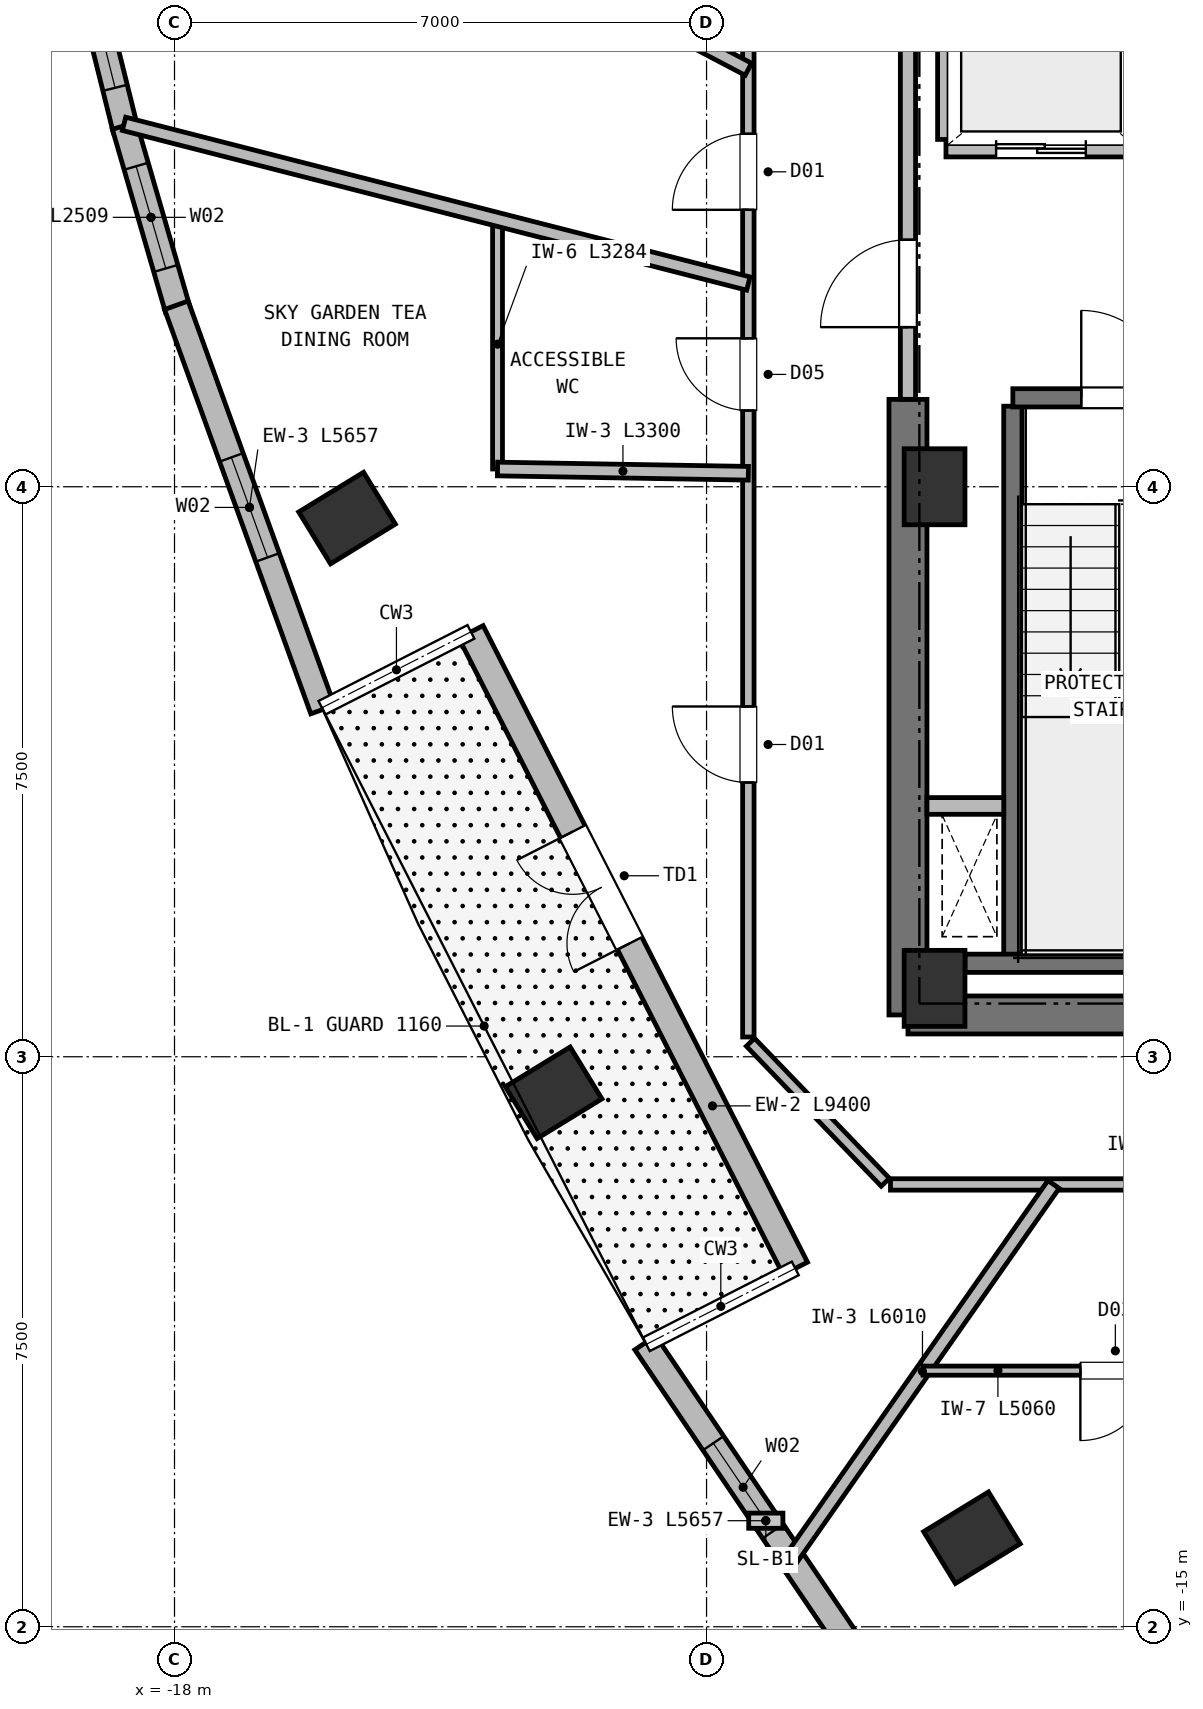
"""IFC4 building model, lengths in metres.
Left out: names, types, materials, properties, quantities, classifications, styles, units other than length and angle.
Written with IfcOpenShell. Run it as: python <this file> out.ifc"""

import sys

from ifc_helpers import new_model, si_unit, direction, frame, frame_2d, origin, origin_2d, place, context, subcontext, project, spatial, rectangle, extrude, element, fill, save


model = new_model("IFC4")
c1 = context("Model", 3, precision=1e-05, world=origin(), true_north=direction((0.0, 1.0)))
c2 = subcontext(c1, "Body", "Model", "MODEL_VIEW")
j1 = project(units=[si_unit("LENGTHUNIT", "METRE"), si_unit("PLANEANGLEUNIT", "RADIAN")], contexts=[c1])
p1 = place(None, origin())
s1 = spatial("IfcSite", under=j1, at=p1, CompositionType="ELEMENT")
p2 = place(p1, origin())
s2 = spatial("IfcBuilding", under=s1, at=p2, CompositionType="ELEMENT")
p3 = place(p2, frame((0.0, 0.0, 194.15)))
s3 = spatial("IfcBuildingStorey", under=s2, at=p3, CompositionType="ELEMENT", Elevation=194.15)
for number, where, z_axis, x_axis in (
    (1, (-8.0, -6.6, 0.0), (0.0, 0.0, 1.0), (1.0, 0.0, 0.0)),
    (2, (-8.0, 0.0, 0.0), (0.0, 0.0, 1.0), (1.0, 0.0, 0.0)),
):
    element("IfcColumn", number, at=place(p3, frame(where, z_axis=z_axis, x_axis=x_axis)), inside=s3, PredefinedType="COLUMN", context=c2, shape_type="SweptSolid", body=[
        extrude(rectangle(XDim=0.8, YDim=1.0, at=origin_2d()), origin(), (0.0, 0.0, 1.0), 3.8),
    ])
p4 = place(p3, frame((-8.35, -6.95, 0.0), z_axis=(0.0, 0.0, 1.0), x_axis=(1.0, 0.0, 0.0)))
e3 = element("IfcWall", 3, at=p4, inside=s3, PredefinedType="SHEAR", context=c2, shape_type="SweptSolid", body=[
    extrude(rectangle(XDim=3.95, YDim=0.5, at=frame_2d((1.975, 0.0))), origin(), (0.0, 0.0, 1.0), 3.55),
])
p5 = place(p3, frame((-8.35, -6.95, 0.0), z_axis=(0.0, 0.0, 1.0), x_axis=(0.0, 1.0, 0.0)))
e4 = element("IfcWall", 4, at=p5, inside=s3, PredefinedType="SHEAR", context=c2, shape_type="SweptSolid", body=[
    extrude(rectangle(XDim=8.1, YDim=0.5, at=frame_2d((4.05, 0.0))), origin(), (0.0, 0.0, 1.0), 3.55),
])
for number, where, z_axis, x_axis in (
    (5, (-15.73, -0.412, 0.0), (0.0, 0.0, 1.0), (-0.522, 0.853, 0.0)),
    (6, (-13.012, -7.974, 0.0), (0.0, 0.0, 1.0), (-0.522, 0.853, 0.0)),
    (7, (-7.508, -13.828, 0.0), (0.0, 0.0, 1.0), (-0.522, 0.853, 0.0)),
):
    element("IfcColumn", number, at=place(p3, frame(where, z_axis=z_axis, x_axis=x_axis)), inside=s3, PredefinedType="COLUMN", context=c2, shape_type="SweptSolid", body=[
        extrude(rectangle(XDim=0.8, YDim=1.0, at=origin_2d()), origin(), (0.0, 0.0, 1.0), 3.8),
    ])
p6 = place(p3, frame((-9.833, -10.285, 0.0), z_axis=(0.0, 0.0, 1.0), x_axis=(-0.453963909428, 0.891020072129, 0.0)))
e8 = element("IfcWall", 8, at=p6, inside=s3, PredefinedType="SOLIDWALL", context=c2, shape_type="SweptSolid", body=[
    extrude(rectangle(XDim=9.4, YDim=0.36, at=frame_2d((4.7, 0.0))), origin(), (0.0, 0.0, 1.0), 3.23),
])
p7 = place(p6, frame((4.8, 0.0, 0.0)))
e9 = element("IfcOpeningElement", 9, at=p7, cuts=e8, PredefinedType="OPENING", context=c2, shape_type="SweptSolid", body=[
    extrude(rectangle(XDim=1.65, YDim=2.25, at=frame_2d((0.825, 1.125))), frame((0.0, 0.19, 0.0), z_axis=(0.0, -1.0, 0.0), x_axis=(1.0, 0.0, 0.0)), (0.0, 0.0, 1.0), 0.38),
])
p8 = place(p3, frame((-18.646, 4.701, 0.0), z_axis=(0.0, 0.0, 1.0), x_axis=(-0.241149785718, 0.970487908656, 0.0)))
e10 = element("IfcWall", 10, at=p8, inside=s3, PredefinedType="SOLIDWALL", context=c2, shape_type="SweptSolid", body=[
    extrude(rectangle(XDim=2.529, YDim=0.33, at=frame_2d((1.265, 0.0))), origin(), (0.0, 0.0, 1.0), 3.55),
])
p9 = place(p8, frame((0.564, 0.0, 0.72)))
e11 = element("IfcOpeningElement", 11, at=p9, cuts=e10, PredefinedType="OPENING", context=c2, shape_type="SweptSolid", body=[
    extrude(rectangle(XDim=1.4, YDim=1.84, at=frame_2d((0.7, 0.92))), frame((0.0, 0.175, 0.0), z_axis=(0.0, -1.0, 0.0), x_axis=(1.0, 0.0, 0.0)), (0.0, 0.0, 1.0), 0.35),
])
p10 = place(p3, frame((-17.96, 2.34, 0.0), z_axis=(0.0, 0.0, 1.0), x_axis=(-0.278497522166, 0.960436947513, 0.0)))
e12 = element("IfcWall", 12, at=p10, inside=s3, PredefinedType="SOLIDWALL", context=c2, shape_type="SweptSolid", body=[
    extrude(rectangle(XDim=2.509, YDim=0.33, at=frame_2d((1.254, 0.0))), origin(), (0.0, 0.0, 1.0), 3.55),
])
p11 = place(p10, frame((0.554, 0.0, 0.72)))
e13 = element("IfcOpeningElement", 13, at=p11, cuts=e12, PredefinedType="OPENING", context=c2, shape_type="SweptSolid", body=[
    extrude(rectangle(XDim=1.4, YDim=1.84, at=frame_2d((0.7, 0.92))), frame((0.0, 0.175, 0.0), z_axis=(0.0, -1.0, 0.0), x_axis=(1.0, 0.0, 0.0)), (0.0, 0.0, 1.0), 0.35),
])
p12 = place(p3, frame((-16.052, -2.932, 0.0), z_axis=(0.0, 0.0, 1.0), x_axis=(-0.340145014301, 0.940372994745, 0.0)))
e14 = element("IfcWall", 14, at=p12, inside=s3, PredefinedType="SOLIDWALL", context=c2, shape_type="SweptSolid", body=[
    extrude(rectangle(XDim=5.657, YDim=0.33, at=frame_2d((2.828, 0.0))), origin(), (0.0, 0.0, 1.0), 3.55),
])
p13 = place(p12, frame((2.128, 0.0, 0.72)))
e15 = element("IfcOpeningElement", 15, at=p13, cuts=e14, PredefinedType="OPENING", context=c2, shape_type="SweptSolid", body=[
    extrude(rectangle(XDim=1.4, YDim=1.88, at=frame_2d((0.7, 0.94))), frame((0.0, 0.175, 0.0), z_axis=(0.0, -1.0, 0.0), x_axis=(1.0, 0.0, 0.0)), (0.0, 0.0, 1.0), 0.35),
])
p14 = place(p3, frame((-8.634, -15.946, 0.0), z_axis=(0.0, 0.0, 1.0), x_axis=(-0.560840510301, 0.827923862444, 0.0)))
e16 = element("IfcWall", 16, at=p14, inside=s3, PredefinedType="SOLIDWALL", context=c2, shape_type="SweptSolid", body=[
    extrude(rectangle(XDim=5.656, YDim=0.33, at=frame_2d((2.828, 0.0))), origin(), (0.0, 0.0, 1.0), 3.55),
])
p15 = place(p14, frame((2.66, 0.0, 0.72)))
e17 = element("IfcOpeningElement", 17, at=p15, cuts=e16, PredefinedType="OPENING", context=c2, shape_type="SweptSolid", body=[
    extrude(rectangle(XDim=1.4, YDim=1.88, at=frame_2d((0.7, 0.94))), frame((0.0, 0.175, 0.0), z_axis=(0.0, -1.0, 0.0), x_axis=(1.0, 0.0, 0.0)), (0.0, 0.0, 1.0), 0.35),
])
p16 = place(p3, frame((-6.97, -6.16, 0.0), z_axis=(0.0, 0.0, 1.0), x_axis=(0.0, 1.0, 0.0)))
e18 = element("IfcWall", 18, at=p16, inside=s3, PredefinedType="SHEAR", context=c2, shape_type="SweptSolid", body=[
    extrude(rectangle(XDim=7.22, YDim=0.24, at=frame_2d((3.61, 0.0))), origin(), (0.0, 0.0, 1.0), 3.55),
])
p17 = place(p3, frame((-7.6, -6.27, 0.0), z_axis=(0.0, 0.0, 1.0), x_axis=(1.0, 0.0, 0.0)))
e19 = element("IfcWall", 19, at=p17, inside=s3, PredefinedType="SHEAR", context=c2, shape_type="SweptSolid", body=[
    extrude(rectangle(XDim=3.59, YDim=0.24, at=frame_2d((1.795, 0.0))), origin(), (0.0, 0.0, 1.0), 3.55),
])
p18 = place(p3, frame((-6.97, 1.17, 0.0), z_axis=(0.0, 0.0, 1.0), x_axis=(1.0, 0.0, 0.0)))
e20 = element("IfcWall", 20, at=p18, inside=s3, PredefinedType="SHEAR", context=c2, shape_type="SweptSolid", body=[
    extrude(rectangle(XDim=2.96, YDim=0.24, at=frame_2d((1.48, 0.0))), origin(), (0.0, 0.0, 1.0), 3.55),
])
p19 = place(p18, frame((0.9, 0.0, 0.0)))
e21 = element("IfcOpeningElement", 21, at=p19, cuts=e20, PredefinedType="OPENING", context=c2, shape_type="SweptSolid", body=[
    extrude(rectangle(XDim=1.15, YDim=2.15, at=frame_2d((0.575, 1.075))), frame((0.0, 0.13, 0.0), z_axis=(0.0, -1.0, 0.0), x_axis=(1.0, 0.0, 0.0)), (0.0, 0.0, 1.0), 0.26),
])
p20 = place(p3, frame((-8.1, -4.2, 0.0), z_axis=(0.0, 0.0, 1.0), x_axis=(1.0, 0.0, 0.0)))
e22 = element("IfcWall", 22, at=p20, inside=s3, PredefinedType="PARTITIONING", context=c2, shape_type="SweptSolid", body=[
    extrude(rectangle(XDim=1.01, YDim=0.22, at=frame_2d((0.505, 0.0))), origin(), (0.0, 0.0, 1.0), 3.55),
])
p21 = place(p3, frame((-7.85, 4.45, 0.0), z_axis=(0.0, 0.0, 1.0), x_axis=(1.0, 0.0, 0.0)))
e23 = element("IfcWall", 23, at=p21, inside=s3, PredefinedType="PARTITIONING", context=c2, shape_type="SweptSolid", body=[
    extrude(rectangle(XDim=2.5, YDim=0.22, at=frame_2d((1.25, 0.0))), origin(), (0.0, 0.0, 1.0), 3.55),
])
p22 = place(p21, frame((0.66, 0.0, 0.0)))
e24 = element("IfcOpeningElement", 24, at=p22, cuts=e23, PredefinedType="OPENING", context=c2, shape_type="SweptSolid", body=[
    extrude(rectangle(XDim=1.18, YDim=2.15, at=frame_2d((0.59, 1.075))), frame((0.0, 0.12, 0.0), z_axis=(0.0, -1.0, 0.0), x_axis=(1.0, 0.0, 0.0)), (0.0, 0.0, 1.0), 0.24),
])
p23 = place(p3, frame((-7.85, 4.57, 0.0), z_axis=(0.0, 0.0, 1.0), x_axis=(0.0, 1.0, 0.0)))
e25 = element("IfcWall", 25, at=p23, inside=s3, PredefinedType="PARTITIONING", context=c2, shape_type="SweptSolid", body=[
    extrude(rectangle(XDim=2.13, YDim=0.22, at=frame_2d((1.065, 0.0))), origin(), (0.0, 0.0, 1.0), 3.18),
])
p24 = place(p3, frame((-8.35, 1.15, 0.0), z_axis=(0.0, 0.0, 1.0), x_axis=(0.0, 1.0, 0.0)))
e26 = element("IfcWall", 26, at=p24, inside=s3, PredefinedType="PARTITIONING", context=c2, shape_type="SweptSolid", body=[
    extrude(rectangle(XDim=5.4, YDim=0.2, at=frame_2d((2.7, 0.0))), origin(), (0.0, 0.0, 1.0), 3.55),
])
p25 = place(p24, frame((0.95, 0.0, 0.0)))
e27 = element("IfcOpeningElement", 27, at=p25, cuts=e26, PredefinedType="OPENING", context=c2, shape_type="SweptSolid", body=[
    extrude(rectangle(XDim=1.15, YDim=2.15, at=frame_2d((0.575, 1.075))), frame((0.0, 0.11, 0.0), z_axis=(0.0, -1.0, 0.0), x_axis=(1.0, 0.0, 0.0)), (0.0, 0.0, 1.0), 0.22),
])
p26 = place(p3, frame((8.58, -9.18, 0.0), z_axis=(0.0, 0.0, 1.0), x_axis=(-1.0, 0.0, 0.0)))
e28 = element("IfcWall", 28, at=p26, inside=s3, PredefinedType="PARTITIONING", context=c2, shape_type="SweptSolid", body=[
    extrude(rectangle(XDim=17.16, YDim=0.15, at=frame_2d((8.58, 0.0))), origin(), (0.0, 0.0, 1.0), 3.23),
])
p27 = place(p26, frame((1.546, 0.0, 0.0)))
e29 = element("IfcOpeningElement", 29, at=p27, cuts=e28, PredefinedType="OPENING", context=c2, shape_type="SweptSolid", body=[
    extrude(rectangle(XDim=1.06, YDim=2.15, at=frame_2d((0.53, 1.075))), frame((0.0, 0.085, 0.0), z_axis=(0.0, -1.0, 0.0), x_axis=(1.0, 0.0, 0.0)), (0.0, 0.0, 1.0), 0.17),
])
p28 = place(p26, frame((8.615, 0.0, 0.0)))
e30 = element("IfcOpeningElement", 30, at=p28, cuts=e28, PredefinedType="OPENING", context=c2, shape_type="SweptSolid", body=[
    extrude(rectangle(XDim=1.06, YDim=2.15, at=frame_2d((0.53, 1.075))), frame((0.0, 0.085, 0.0), z_axis=(0.0, -1.0, 0.0), x_axis=(1.0, 0.0, 0.0)), (0.0, 0.0, 1.0), 0.17),
])
p29 = place(p3, frame((-10.45, -7.24, 0.0), z_axis=(0.0, 0.0, 1.0), x_axis=(0.0, 1.0, 0.0)))
e31 = element("IfcWall", 31, at=p29, inside=s3, PredefinedType="PARTITIONING", context=c2, shape_type="SweptSolid", body=[
    extrude(rectangle(XDim=14.48, YDim=0.15, at=frame_2d((7.24, 0.0))), origin(), (0.0, 0.0, 1.0), 3.23),
])
p30 = place(p29, frame((8.243, 0.0, 0.0)))
e32 = element("IfcOpeningElement", 32, at=p30, cuts=e31, PredefinedType="OPENING", context=c2, shape_type="SweptSolid", body=[
    extrude(rectangle(XDim=0.95, YDim=2.1, at=frame_2d((0.475, 1.05))), frame((0.0, 0.085, 0.0), z_axis=(0.0, -1.0, 0.0), x_axis=(1.0, 0.0, 0.0)), (0.0, 0.0, 1.0), 0.17),
])
p31 = place(p29, frame((10.884, 0.0, 0.0)))
e33 = element("IfcOpeningElement", 33, at=p31, cuts=e31, PredefinedType="OPENING", context=c2, shape_type="SweptSolid", body=[
    extrude(rectangle(XDim=1.0, YDim=2.15, at=frame_2d((0.5, 1.075))), frame((0.0, 0.085, 0.0), z_axis=(0.0, -1.0, 0.0), x_axis=(1.0, 0.0, 0.0)), (0.0, 0.0, 1.0), 0.17),
])
p32 = place(p29, frame((3.349, 0.0, 0.0)))
e34 = element("IfcOpeningElement", 34, at=p32, cuts=e31, PredefinedType="OPENING", context=c2, shape_type="SweptSolid", body=[
    extrude(rectangle(XDim=1.0, YDim=2.15, at=frame_2d((0.5, 1.075))), frame((0.0, 0.085, 0.0), z_axis=(0.0, -1.0, 0.0), x_axis=(1.0, 0.0, 0.0)), (0.0, 0.0, 1.0), 0.17),
])
p33 = place(p3, frame((-8.648, -9.151, 0.0), z_axis=(0.0, 0.0, 1.0), x_axis=(-0.693764562202, 0.720201869085, 0.0)))
e35 = element("IfcWall", 35, at=p33, inside=s3, PredefinedType="PARTITIONING", context=c2, shape_type="SweptSolid", body=[
    extrude(rectangle(XDim=2.558, YDim=0.15, at=frame_2d((1.279, 0.0))), origin(), (0.0, 0.0, 1.0), 3.23),
])
p34 = place(p3, frame((-13.75, 0.233, 0.0), z_axis=(0.0, 0.0, 1.0), x_axis=(0.0, 1.0, 0.0)))
e36 = element("IfcWall", 36, at=p34, inside=s3, PredefinedType="PARTITIONING", context=c2, shape_type="SweptSolid", body=[
    extrude(rectangle(XDim=3.285, YDim=0.13, at=frame_2d((1.642, 0.0))), origin(), (0.0, 0.0, 1.0), 3.55),
])
p35 = place(p3, frame((-10.45, 0.177, 0.0), z_axis=(0.0, 0.0, 1.0), x_axis=(-0.999856521487, 0.0169391983, 0.0)))
e37 = element("IfcWall", 37, at=p35, inside=s3, PredefinedType="PARTITIONING", context=c2, shape_type="SweptSolid", body=[
    extrude(rectangle(XDim=3.301, YDim=0.18, at=frame_2d((1.65, 0.0))), origin(), (0.0, 0.0, 1.0), 3.55),
])
p36 = place(p3, frame((-6.434, -9.18, 0.0), z_axis=(0.0, 0.0, 1.0), x_axis=(-0.573963891335, -0.818880608785, 0.0)))
e38 = element("IfcWall", 38, at=p36, inside=s3, PredefinedType="PARTITIONING", context=c2, shape_type="SweptSolid", body=[
    extrude(rectangle(XDim=6.01, YDim=0.18, at=frame_2d((3.005, 0.0))), origin(), (0.0, 0.0, 1.0), 3.55),
])
p37 = place(p3, frame((-3.092, -11.63, 0.0), z_axis=(0.0, 0.0, 1.0), x_axis=(-1.0, 0.0, 0.0)))
e39 = element("IfcWall", 39, at=p37, inside=s3, PredefinedType="PARTITIONING", context=c2, shape_type="SweptSolid", body=[
    extrude(rectangle(XDim=5.06, YDim=0.12, at=frame_2d((2.53, 0.0))), origin(), (0.0, 0.0, 1.0), 3.55),
])
p38 = place(p37, frame((2.07, 0.0, 0.0)))
e40 = element("IfcOpeningElement", 40, at=p38, cuts=e39, PredefinedType="OPENING", context=c2, shape_type="SweptSolid", body=[
    extrude(rectangle(XDim=0.92, YDim=2.1, at=frame_2d((0.46, 1.05))), frame((0.0, 0.07, 0.0), z_axis=(0.0, -1.0, 0.0), x_axis=(1.0, 0.0, 0.0)), (0.0, 0.0, 1.0), 0.14),
])
p39 = place(p3, frame((-10.45, 5.493, 0.0), z_axis=(0.0, 0.0, 1.0), x_axis=(-0.885159330624, 0.465288039187, 0.0)))
e41 = element("IfcWall", 41, at=p39, inside=s3, PredefinedType="PARTITIONING", context=c2, shape_type="SweptSolid", body=[
    extrude(rectangle(XDim=10.45, YDim=0.18, at=frame_2d((5.225, 0.0))), origin(), (0.0, 0.0, 1.0), 3.55),
])
p40 = place(p3, frame((-10.45, 2.674, 0.0), z_axis=(0.0, 0.0, 1.0), x_axis=(-0.968789680245, 0.247884157321, 0.0)))
e42 = element("IfcWall", 42, at=p40, inside=s3, PredefinedType="PARTITIONING", context=c2, shape_type="SweptSolid", body=[
    extrude(rectangle(XDim=8.479, YDim=0.18, at=frame_2d((4.24, 0.0))), origin(), (0.0, 0.0, 1.0), 3.55),
])
p41 = place(p7, origin())
e43 = element("IfcDoor", 43, at=p41, inside=s3, OperationType="DOUBLE_DOOR_SINGLE_SWING", PredefinedType="DOOR", context=c2, shape_type="SweptSolid", body=[
    extrude(rectangle(XDim=1.65, YDim=2.25, at=frame_2d((0.825, 1.125))), frame((0.0, 0.025, 0.0), z_axis=(0.0, -1.0, 0.0), x_axis=(1.0, 0.0, 0.0)), (0.0, 0.0, 1.0), 0.05),
])
fill(e9, e43)
p42 = place(p9, origin())
e44 = element("IfcWindow", 44, at=p42, inside=s3, PartitioningType="SINGLE_PANEL", PredefinedType="WINDOW", context=c2, shape_type="SweptSolid", body=[
    extrude(rectangle(XDim=1.4, YDim=1.84, at=frame_2d((0.7, 0.92))), frame((0.0, 0.03, 0.0), z_axis=(0.0, -1.0, 0.0), x_axis=(1.0, 0.0, 0.0)), (0.0, 0.0, 1.0), 0.06),
])
fill(e11, e44)
p43 = place(p11, origin())
e45 = element("IfcWindow", 45, at=p43, inside=s3, PartitioningType="SINGLE_PANEL", PredefinedType="WINDOW", context=c2, shape_type="SweptSolid", body=[
    extrude(rectangle(XDim=1.4, YDim=1.84, at=frame_2d((0.7, 0.92))), frame((0.0, 0.03, 0.0), z_axis=(0.0, -1.0, 0.0), x_axis=(1.0, 0.0, 0.0)), (0.0, 0.0, 1.0), 0.06),
])
fill(e13, e45)
p44 = place(p13, origin())
e46 = element("IfcWindow", 46, at=p44, inside=s3, PartitioningType="SINGLE_PANEL", PredefinedType="WINDOW", context=c2, shape_type="SweptSolid", body=[
    extrude(rectangle(XDim=1.4, YDim=1.88, at=frame_2d((0.7, 0.94))), frame((0.0, 0.03, 0.0), z_axis=(0.0, -1.0, 0.0), x_axis=(1.0, 0.0, 0.0)), (0.0, 0.0, 1.0), 0.06),
])
fill(e15, e46)
p45 = place(p15, origin())
e47 = element("IfcWindow", 47, at=p45, inside=s3, PartitioningType="SINGLE_PANEL", PredefinedType="WINDOW", context=c2, shape_type="SweptSolid", body=[
    extrude(rectangle(XDim=1.4, YDim=1.88, at=frame_2d((0.7, 0.94))), frame((0.0, 0.03, 0.0), z_axis=(0.0, -1.0, 0.0), x_axis=(1.0, 0.0, 0.0)), (0.0, 0.0, 1.0), 0.06),
])
fill(e17, e47)
p46 = place(p19, origin())
e48 = element("IfcDoor", 48, at=p46, inside=s3, OperationType="SINGLE_SWING_LEFT", PredefinedType="DOOR", context=c2, shape_type="SweptSolid", body=[
    extrude(rectangle(XDim=1.15, YDim=2.15, at=frame_2d((0.575, 1.075))), frame((0.0, 0.025, 0.0), z_axis=(0.0, -1.0, 0.0), x_axis=(1.0, 0.0, 0.0)), (0.0, 0.0, 1.0), 0.05),
])
fill(e21, e48)
p47 = place(p22, origin())
e49 = element("IfcDoor", 49, at=p47, inside=s3, OperationType="DOUBLE_DOOR_SLIDING", PredefinedType="DOOR", context=c2, shape_type="SweptSolid", body=[
    extrude(rectangle(XDim=1.18, YDim=2.15, at=frame_2d((0.59, 1.075))), frame((0.0, 0.025, 0.0), z_axis=(0.0, -1.0, 0.0), x_axis=(1.0, 0.0, 0.0)), (0.0, 0.0, 1.0), 0.05),
])
fill(e24, e49)
p48 = place(p25, origin())
e50 = element("IfcDoor", 50, at=p48, inside=s3, OperationType="SINGLE_SWING_LEFT", PredefinedType="DOOR", context=c2, shape_type="SweptSolid", body=[
    extrude(rectangle(XDim=1.15, YDim=2.15, at=frame_2d((0.575, 1.075))), frame((0.0, 0.025, 0.0), z_axis=(0.0, -1.0, 0.0), x_axis=(1.0, 0.0, 0.0)), (0.0, 0.0, 1.0), 0.05),
])
fill(e27, e50)
p49 = place(p38, origin())
e51 = element("IfcDoor", 51, at=p49, inside=s3, OperationType="SINGLE_SWING_RIGHT", PredefinedType="DOOR", context=c2, shape_type="SweptSolid", body=[
    extrude(rectangle(XDim=0.92, YDim=2.1, at=frame_2d((0.46, 1.05))), frame((0.0, 0.025, 0.0), z_axis=(0.0, -1.0, 0.0), x_axis=(1.0, 0.0, 0.0)), (0.0, 0.0, 1.0), 0.05),
])
fill(e40, e51)
p50 = place(p30, origin())
e52 = element("IfcDoor", 52, at=p50, inside=s3, OperationType="SINGLE_SWING_RIGHT", PredefinedType="DOOR", context=c2, shape_type="SweptSolid", body=[
    extrude(rectangle(XDim=0.95, YDim=2.1, at=frame_2d((0.475, 1.05))), frame((0.0, 0.025, 0.0), z_axis=(0.0, -1.0, 0.0), x_axis=(1.0, 0.0, 0.0)), (0.0, 0.0, 1.0), 0.05),
])
fill(e32, e52)
p51 = place(p31, origin())
e53 = element("IfcDoor", 53, at=p51, inside=s3, OperationType="SINGLE_SWING_LEFT", PredefinedType="DOOR", context=c2, shape_type="SweptSolid", body=[
    extrude(rectangle(XDim=1.0, YDim=2.15, at=frame_2d((0.5, 1.075))), frame((0.0, 0.025, 0.0), z_axis=(0.0, -1.0, 0.0), x_axis=(1.0, 0.0, 0.0)), (0.0, 0.0, 1.0), 0.05),
])
fill(e33, e53)
p52 = place(p32, origin())
e54 = element("IfcDoor", 54, at=p52, inside=s3, OperationType="SINGLE_SWING_RIGHT", PredefinedType="DOOR", context=c2, shape_type="SweptSolid", body=[
    extrude(rectangle(XDim=1.0, YDim=2.15, at=frame_2d((0.5, 1.075))), frame((0.0, 0.025, 0.0), z_axis=(0.0, -1.0, 0.0), x_axis=(1.0, 0.0, 0.0)), (0.0, 0.0, 1.0), 0.05),
])
fill(e34, e54)
save(model, sys.argv[1])
